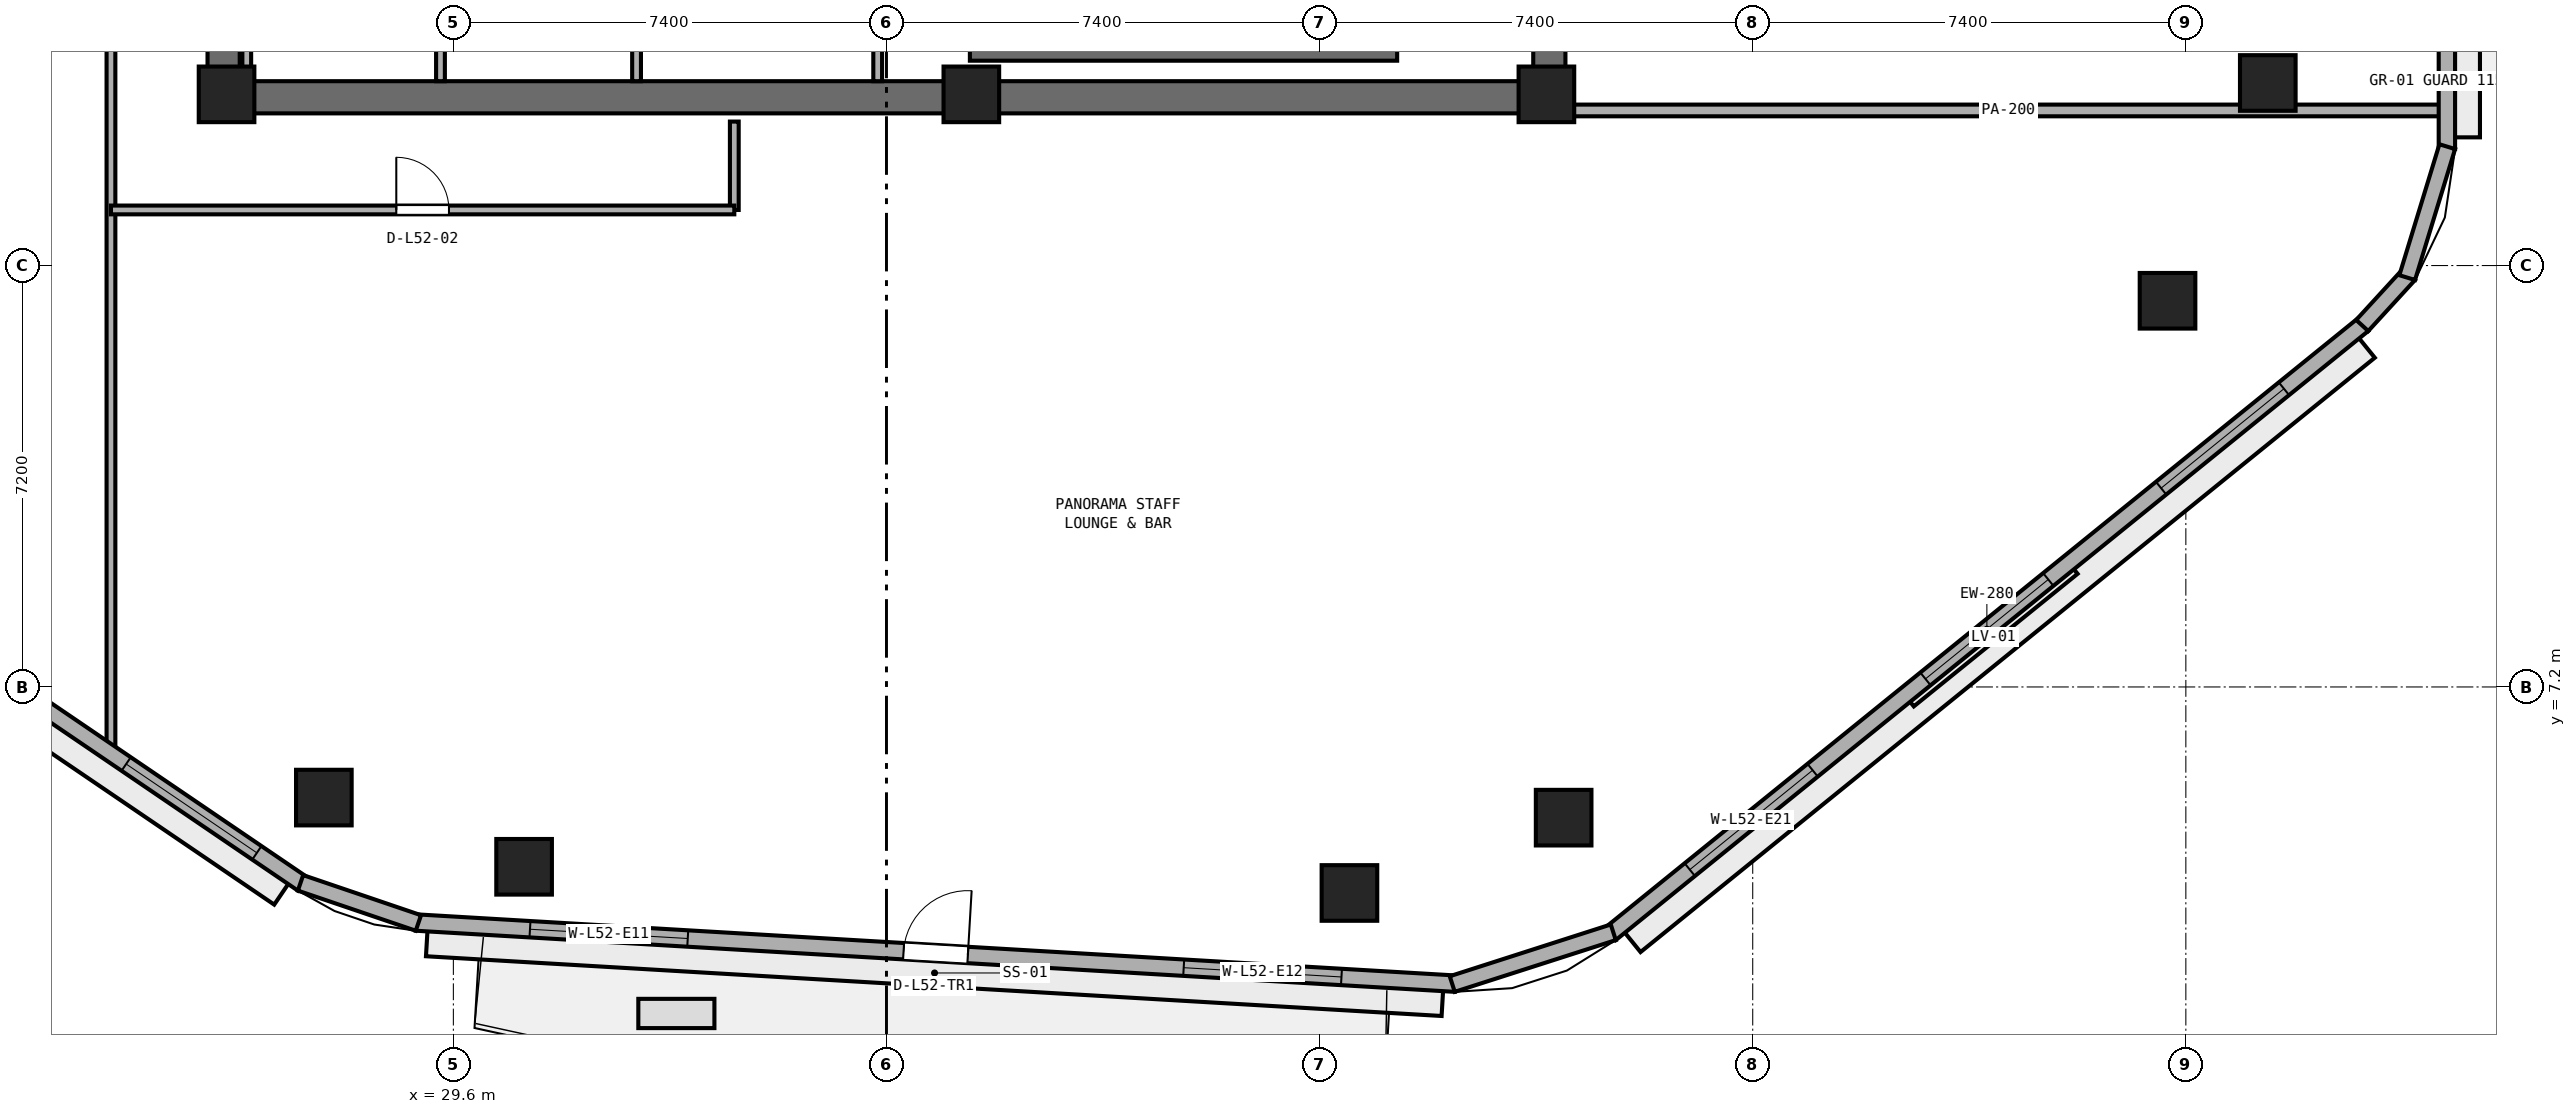
"""IFC4 building model, lengths in metres.
Left out: names, types, materials, properties, quantities, classifications, styles, units other than length and angle.
Written with IfcOpenShell. Run it as: python <this file> out.ifc"""

import sys

from ifc_helpers import new_model, si_unit, direction, frame, frame_2d, origin, origin_2d, place, context, subcontext, project, spatial, rectangle, extrude, element, fill, save


model = new_model("IFC4")
c1 = context("Model", 3, precision=1e-05, world=origin(), true_north=direction((0.0, 1.0)))
c2 = subcontext(c1, "Body", "Model", "MODEL_VIEW")
j1 = project(units=[si_unit("LENGTHUNIT", "METRE"), si_unit("PLANEANGLEUNIT", "RADIAN")], contexts=[c1])
p1 = place(None, origin())
s1 = spatial("IfcSite", under=j1, at=p1, CompositionType="ELEMENT")
p2 = place(p1, origin())
s2 = spatial("IfcBuilding", under=s1, at=p2, CompositionType="ELEMENT")
p3 = place(p2, frame((0.0, 0.0, 204.8)))
s3 = spatial("IfcBuildingStorey", under=s2, at=p3, CompositionType="ELEMENT", Elevation=204.8)
p4 = place(p3, frame((25.4, 17.275, 0.0), z_axis=(0.0, 0.0, 1.0), x_axis=(1.0, 0.0, 0.0)))
e1 = element("IfcWall", 1, at=p4, inside=s3, PredefinedType="SHEAR", context=c2, shape_type="SweptSolid", body=[
    extrude(rectangle(XDim=23.2, YDim=0.55, at=frame_2d((11.6, 0.0))), origin(), (0.0, 0.0, 1.0), 3.54),
])
p5 = place(p3, frame((25.675, 17.55, 0.0), z_axis=(0.0, 0.0, 1.0), x_axis=(0.0, 1.0, 0.0)))
e2 = element("IfcWall", 2, at=p5, inside=s3, PredefinedType="SHEAR", context=c2, shape_type="SweptSolid", body=[
    extrude(rectangle(XDim=15.3, YDim=0.55, at=frame_2d((7.65, 0.0))), origin(), (0.0, 0.0, 1.0), 3.54),
])
p6 = place(p5, frame((6.9, 0.0, 0.0)))
e3 = element("IfcOpeningElement", 3, at=p6, cuts=e2, PredefinedType="OPENING", context=c2, shape_type="SweptSolid", body=[
    extrude(rectangle(XDim=1.5, YDim=2.15, at=frame_2d((0.75, 1.075))), frame((0.0, 0.285, 0.0), z_axis=(0.0, -1.0, 0.0), x_axis=(1.0, 0.0, 0.0)), (0.0, 0.0, 1.0), 0.57),
])
p7 = place(p3, frame((48.325, 17.55, 0.0), z_axis=(0.0, 0.0, 1.0), x_axis=(0.0, 1.0, 0.0)))
e4 = element("IfcWall", 4, at=p7, inside=s3, PredefinedType="SHEAR", context=c2, shape_type="SweptSolid", body=[
    extrude(rectangle(XDim=15.3, YDim=0.55, at=frame_2d((7.65, 0.0))), origin(), (0.0, 0.0, 1.0), 3.54),
])
p8 = place(p7, frame((5.75, 0.0, 0.0)))
e5 = element("IfcOpeningElement", 5, at=p8, cuts=e4, PredefinedType="OPENING", context=c2, shape_type="SweptSolid", body=[
    extrude(rectangle(XDim=1.5, YDim=2.15, at=frame_2d((0.75, 1.075))), frame((0.0, 0.285, 0.0), z_axis=(0.0, -1.0, 0.0), x_axis=(1.0, 0.0, 0.0)), (0.0, 0.0, 1.0), 0.57),
])
for number, where, z_axis, x_axis in (
    (6, (25.725, 17.325, 0.0), (0.0, 0.0, 1.0), (1.0, 0.0, 0.0)),
    (7, (38.45, 17.325, 0.0), (0.0, 0.0, 1.0), (1.0, 0.0, 0.0)),
    (8, (48.275, 17.325, 0.0), (0.0, 0.0, 1.0), (1.0, 0.0, 0.0)),
):
    element("IfcColumn", number, at=place(p3, frame(where, z_axis=z_axis, x_axis=x_axis)), inside=s3, PredefinedType="PILASTER", context=c2, shape_type="SweptSolid", body=[
        extrude(rectangle(XDim=0.95, YDim=0.95, at=origin_2d()), origin(), (0.0, 0.0, 1.0), 3.8),
    ])
for number, where, z_axis, x_axis in (
    (9, (30.809, 4.127, 0.0), (0.0, 0.0, 1.0), (1.0, 0.0, 0.0)),
    (10, (44.91, 3.68, 0.0), (0.0, 0.0, 1.0), (1.0, 0.0, 0.0)),
    (11, (48.57, 4.967, 0.0), (0.0, 0.0, 1.0), (1.0, 0.0, 0.0)),
    (12, (58.887, 13.798, 0.0), (0.0, 0.0, 1.0), (1.0, 0.0, 0.0)),
    (13, (60.6, 17.519, 0.0), (0.0, 0.0, 1.0), (1.0, 0.0, 0.0)),
    (14, (27.387, 5.31, 0.0), (0.0, 0.0, 1.0), (1.0, 0.0, 0.0)),
):
    element("IfcColumn", number, at=place(p3, frame(where, z_axis=z_axis, x_axis=x_axis)), inside=s3, PredefinedType="COLUMN", context=c2, shape_type="SweptSolid", body=[
        extrude(rectangle(XDim=0.95, YDim=0.95, at=origin_2d()), origin(), (0.0, 0.0, 1.0), 3.8),
    ])
p9 = place(p3, frame((38.425, 18.025, 0.0), z_axis=(0.0, 0.0, 1.0), x_axis=(1.0, 0.0, 0.0)))
e15 = element("IfcWall", 15, at=p9, inside=s3, PredefinedType="SHEAR", context=c2, shape_type="SweptSolid", body=[
    extrude(rectangle(XDim=7.3, YDim=0.25, at=frame_2d((3.65, 0.0))), origin(), (0.0, 0.0, 1.0), 3.54),
])
p10 = place(p3, frame((26.07, 17.55, 0.0), z_axis=(0.0, 0.0, 1.0), x_axis=(0.0, 1.0, 0.0)))
e16 = element("IfcWall", 16, at=p10, inside=s3, PredefinedType="PARTITIONING", context=c2, shape_type="SweptSolid", body=[
    extrude(rectangle(XDim=2.2, YDim=0.15, at=frame_2d((1.1, 0.0))), origin(), (0.0, 0.0, 1.0), 2.64),
])
for number, where, z_axis, x_axis in (
    (17, (29.38, 17.55, 0.0), (0.0, 0.0, 1.0), (0.0, 1.0, 0.0)),
    (18, (32.73, 17.55, 0.0), (0.0, 0.0, 1.0), (0.0, 1.0, 0.0)),
    (19, (36.85, 17.55, 0.0), (0.0, 0.0, 1.0), (0.0, 1.0, 0.0)),
):
    element("IfcWall", number, at=place(p3, frame(where, z_axis=z_axis, x_axis=x_axis)), inside=s3, PredefinedType="PARTITIONING", context=c2, shape_type="SweptSolid", body=[
        extrude(rectangle(XDim=2.2, YDim=0.15, at=frame_2d((1.1, 0.0))), origin(), (0.0, 0.0, 1.0), 3.54),
    ])
p11 = place(p3, frame((34.4, 15.35, 0.0), z_axis=(0.0, 0.0, 1.0), x_axis=(0.0, 1.0, 0.0)))
e20 = element("IfcWall", 20, at=p11, inside=s3, PredefinedType="PARTITIONING", context=c2, shape_type="SweptSolid", body=[
    extrude(rectangle(XDim=1.51, YDim=0.15, at=frame_2d((0.755, 0.0))), origin(), (0.0, 0.0, 1.0), 3.54),
])
p12 = place(p3, frame((23.75, 6.031, 0.0), z_axis=(0.0, 0.0, 1.0), x_axis=(0.0, 1.0, 0.0)))
e21 = element("IfcWall", 21, at=p12, inside=s3, PredefinedType="PARTITIONING", context=c2, shape_type="SweptSolid", body=[
    extrude(rectangle(XDim=17.819, YDim=0.15, at=frame_2d((8.91, 0.0))), origin(), (0.0, 0.0, 1.0), 3.54),
])
p13 = place(p12, frame((12.294, 0.0, 0.0)))
e22 = element("IfcOpeningElement", 22, at=p13, cuts=e21, PredefinedType="OPENING", context=c2, shape_type="SweptSolid", body=[
    extrude(rectangle(XDim=0.9, YDim=2.1, at=frame_2d((0.45, 1.05))), frame((0.0, 0.085, 0.0), z_axis=(0.0, -1.0, 0.0), x_axis=(1.0, 0.0, 0.0)), (0.0, 0.0, 1.0), 0.17),
])
p14 = place(p3, frame((23.75, 15.35, 0.0), z_axis=(0.0, 0.0, 1.0), x_axis=(1.0, 0.0, 0.0)))
e23 = element("IfcWall", 23, at=p14, inside=s3, PredefinedType="PARTITIONING", context=c2, shape_type="SweptSolid", body=[
    extrude(rectangle(XDim=10.65, YDim=0.15, at=frame_2d((5.325, 0.0))), origin(), (0.0, 0.0, 1.0), 3.54),
])
p15 = place(p14, frame((4.875, 0.0, 0.0)))
e24 = element("IfcOpeningElement", 24, at=p15, cuts=e23, PredefinedType="OPENING", context=c2, shape_type="SweptSolid", body=[
    extrude(rectangle(XDim=0.9, YDim=2.1, at=frame_2d((0.45, 1.05))), frame((0.0, 0.085, 0.0), z_axis=(0.0, -1.0, 0.0), x_axis=(1.0, 0.0, 0.0)), (0.0, 0.0, 1.0), 0.17),
])
p16 = place(p3, frame((48.74, 17.05, 0.0), z_axis=(0.0, 0.0, 1.0), x_axis=(1.0, 0.0, 0.0)))
e25 = element("IfcWall", 25, at=p16, inside=s3, PredefinedType="PARTITIONING", context=c2, shape_type="SweptSolid", body=[
    extrude(rectangle(XDim=14.855, YDim=0.2, at=frame_2d((7.427, 0.0))), origin(), (0.0, 0.0, 1.0), 2.923),
])
p17 = place(p3, frame((28.966, 3.175, 0.0), z_axis=(0.0, 0.0, 1.0), x_axis=(0.998274467859, -0.058720412304, 0.0)))
e26 = element("IfcWall", 26, at=p17, inside=s3, PredefinedType="STANDARD", context=c2, shape_type="SweptSolid", body=[
    extrude(rectangle(XDim=17.782, YDim=0.28, at=frame_2d((8.891, 0.0))), origin(), (0.0, 0.0, 1.0), 3.54),
])
p18 = place(p17, frame((8.341, 0.0, 0.0)))
e27 = element("IfcOpeningElement", 27, at=p18, cuts=e26, PredefinedType="OPENING", context=c2, shape_type="SweptSolid", body=[
    extrude(rectangle(XDim=1.1, YDim=2.2, at=frame_2d((0.55, 1.1))), frame((0.0, 0.15, 0.0), z_axis=(0.0, -1.0, 0.0), x_axis=(1.0, 0.0, 0.0)), (0.0, 0.0, 1.0), 0.3),
])
p19 = place(p17, frame((1.947, 0.0, 0.9)))
e28 = element("IfcOpeningElement", 28, at=p19, cuts=e26, PredefinedType="OPENING", context=c2, shape_type="SweptSolid", body=[
    extrude(rectangle(XDim=2.7, YDim=1.75, at=frame_2d((1.35, 0.875))), frame((0.0, 0.15, 0.0), z_axis=(0.0, -1.0, 0.0), x_axis=(1.0, 0.0, 0.0)), (0.0, 0.0, 1.0), 0.3),
])
p20 = place(p17, frame((13.135, 0.0, 0.9)))
e29 = element("IfcOpeningElement", 29, at=p20, cuts=e26, PredefinedType="OPENING", context=c2, shape_type="SweptSolid", body=[
    extrude(rectangle(XDim=2.7, YDim=1.75, at=frame_2d((1.35, 0.875))), frame((0.0, 0.15, 0.0), z_axis=(0.0, -1.0, 0.0), x_axis=(1.0, 0.0, 0.0)), (0.0, 0.0, 1.0), 0.3),
])
p21 = place(p3, frame((49.372, 2.984, 0.0), z_axis=(0.0, 0.0, 1.0), x_axis=(0.777278899851, 0.629156190343, 0.0)))
e30 = element("IfcWall", 30, at=p21, inside=s3, PredefinedType="STANDARD", context=c2, shape_type="SweptSolid", body=[
    extrude(rectangle(XDim=16.54, YDim=0.28, at=frame_2d((8.27, 0.0))), origin(), (0.0, 0.0, 1.0), 3.54),
])
p22 = place(p21, frame((1.74, 0.0, 0.9)))
e31 = element("IfcOpeningElement", 31, at=p22, cuts=e30, PredefinedType="OPENING", context=c2, shape_type="SweptSolid", body=[
    extrude(rectangle(XDim=2.7, YDim=1.75, at=frame_2d((1.35, 0.875))), frame((0.0, 0.15, 0.0), z_axis=(0.0, -1.0, 0.0), x_axis=(1.0, 0.0, 0.0)), (0.0, 0.0, 1.0), 0.3),
])
p23 = place(p21, frame((6.92, 0.0, 0.9)))
e32 = element("IfcOpeningElement", 32, at=p23, cuts=e30, PredefinedType="OPENING", context=c2, shape_type="SweptSolid", body=[
    extrude(rectangle(XDim=2.7, YDim=1.75, at=frame_2d((1.35, 0.875))), frame((0.0, 0.15, 0.0), z_axis=(0.0, -1.0, 0.0), x_axis=(1.0, 0.0, 0.0)), (0.0, 0.0, 1.0), 0.3),
])
p24 = place(p21, frame((12.1, 0.0, 0.9)))
e33 = element("IfcOpeningElement", 33, at=p24, cuts=e30, PredefinedType="OPENING", context=c2, shape_type="SweptSolid", body=[
    extrude(rectangle(XDim=2.7, YDim=1.75, at=frame_2d((1.35, 0.875))), frame((0.0, 0.15, 0.0), z_axis=(0.0, -1.0, 0.0), x_axis=(1.0, 0.0, 0.0)), (0.0, 0.0, 1.0), 0.3),
])
p25 = place(p3, frame((63.66, 16.39, 0.0), z_axis=(0.0, 0.0, 1.0), x_axis=(0.0, 1.0, 0.0)))
e34 = element("IfcWall", 34, at=p25, inside=s3, PredefinedType="STANDARD", context=c2, shape_type="SweptSolid", body=[
    extrude(rectangle(XDim=18.876, YDim=0.28, at=frame_2d((9.438, 0.0))), origin(), (0.0, 0.0, 1.0), 2.79),
])
p26 = place(p25, frame((8.588, 0.0, 0.0)))
e35 = element("IfcOpeningElement", 35, at=p26, cuts=e34, PredefinedType="OPENING", context=c2, shape_type="SweptSolid", body=[
    extrude(rectangle(XDim=1.1, YDim=2.2, at=frame_2d((0.55, 1.1))), frame((0.0, 0.15, 0.0), z_axis=(0.0, -1.0, 0.0), x_axis=(1.0, 0.0, 0.0)), (0.0, 0.0, 1.0), 0.3),
])
p27 = place(p25, frame((2.579, 0.0, 0.85)))
e36 = element("IfcOpeningElement", 36, at=p27, cuts=e34, PredefinedType="OPENING", context=c2, shape_type="SweptSolid", body=[
    extrude(rectangle(XDim=1.8, YDim=1.2, at=frame_2d((0.9, 0.6))), frame((0.0, 0.15, 0.0), z_axis=(0.0, -1.0, 0.0), x_axis=(1.0, 0.0, 0.0)), (0.0, 0.0, 1.0), 0.3),
])
p28 = place(p25, frame((14.497, 0.0, 0.85)))
e37 = element("IfcOpeningElement", 37, at=p28, cuts=e34, PredefinedType="OPENING", context=c2, shape_type="SweptSolid", body=[
    extrude(rectangle(XDim=1.8, YDim=1.2, at=frame_2d((0.9, 0.6))), frame((0.0, 0.15, 0.0), z_axis=(0.0, -1.0, 0.0), x_axis=(1.0, 0.0, 0.0)), (0.0, 0.0, 1.0), 0.3),
])
p29 = place(p3, frame((13.43, 13.075, 0.0), z_axis=(0.0, 0.0, 1.0), x_axis=(0.827025402003, -0.562164552815, 0.0)))
e38 = element("IfcWall", 38, at=p29, inside=s3, PredefinedType="STANDARD", context=c2, shape_type="SweptSolid", body=[
    extrude(rectangle(XDim=16.435, YDim=0.28, at=frame_2d((8.218, 0.0))), origin(), (0.0, 0.0, 1.0), 3.54),
])
p30 = place(p29, frame((1.722, 0.0, 0.9)))
e39 = element("IfcOpeningElement", 39, at=p30, cuts=e38, PredefinedType="OPENING", context=c2, shape_type="SweptSolid", body=[
    extrude(rectangle(XDim=2.7, YDim=1.75, at=frame_2d((1.35, 0.875))), frame((0.0, 0.15, 0.0), z_axis=(0.0, -1.0, 0.0), x_axis=(1.0, 0.0, 0.0)), (0.0, 0.0, 1.0), 0.3),
])
p31 = place(p29, frame((6.868, 0.0, 0.9)))
e40 = element("IfcOpeningElement", 40, at=p31, cuts=e38, PredefinedType="OPENING", context=c2, shape_type="SweptSolid", body=[
    extrude(rectangle(XDim=2.7, YDim=1.75, at=frame_2d((1.35, 0.875))), frame((0.0, 0.15, 0.0), z_axis=(0.0, -1.0, 0.0), x_axis=(1.0, 0.0, 0.0)), (0.0, 0.0, 1.0), 0.3),
])
p32 = place(p29, frame((12.793, 0.0, 0.9)))
e41 = element("IfcOpeningElement", 41, at=p32, cuts=e38, PredefinedType="OPENING", context=c2, shape_type="SweptSolid", body=[
    extrude(rectangle(XDim=2.7, YDim=1.75, at=frame_2d((1.35, 0.875))), frame((0.0, 0.15, 0.0), z_axis=(0.0, -1.0, 0.0), x_axis=(1.0, 0.0, 0.0)), (0.0, 0.0, 1.0), 0.3),
])
p33 = place(p3, frame((46.666, 2.124, 0.0), z_axis=(0.0, 0.0, 1.0), x_axis=(0.952065470694, 0.305894327363, 0.0)))
e42 = element("IfcWall", 42, at=p33, inside=s3, PredefinedType="STANDARD", context=c2, shape_type="SweptSolid", body=[
    extrude(rectangle(XDim=2.89, YDim=0.28, at=frame_2d((1.445, 0.0))), origin(), (0.0, 0.0, 1.0), 3.54),
])
p34 = place(p3, frame((62.213, 13.376, 0.0), z_axis=(0.0, 0.0, 1.0), x_axis=(0.675790054291, 0.737094161232, 0.0)))
e43 = element("IfcWall", 43, at=p34, inside=s3, PredefinedType="STANDARD", context=c2, shape_type="SweptSolid", body=[
    extrude(rectangle(XDim=1.183, YDim=0.28, at=frame_2d((0.591, 0.0))), origin(), (0.0, 0.0, 1.0), 3.54),
])
p35 = place(p3, frame((62.982, 14.194, 0.0), z_axis=(0.0, 0.0, 1.0), x_axis=(0.292398811023, 0.956296468315, 0.0)))
e44 = element("IfcWall", 44, at=p35, inside=s3, PredefinedType="STANDARD", context=c2, shape_type="SweptSolid", body=[
    extrude(rectangle(XDim=2.34, YDim=0.28, at=frame_2d((1.17, 0.0))), origin(), (0.0, 0.0, 1.0), 3.54),
])
p36 = place(p3, frame((26.989, 3.853, 0.0), z_axis=(0.0, 0.0, 1.0), x_axis=(0.946713959835, -0.322075578479, 0.0)))
e45 = element("IfcWall", 45, at=p36, inside=s3, PredefinedType="STANDARD", context=c2, shape_type="SweptSolid", body=[
    extrude(rectangle(XDim=2.127, YDim=0.28, at=frame_2d((1.063, 0.0))), origin(), (0.0, 0.0, 1.0), 3.54),
])
p37 = place(p15, origin())
e46 = element("IfcDoor", 46, at=p37, inside=s3, OperationType="SINGLE_SWING_LEFT", PredefinedType="DOOR", context=c2, shape_type="SweptSolid", body=[
    extrude(rectangle(XDim=0.9, YDim=2.1, at=frame_2d((0.45, 1.05))), frame((0.0, 0.025, 0.0), z_axis=(0.0, -1.0, 0.0), x_axis=(1.0, 0.0, 0.0)), (0.0, 0.0, 1.0), 0.05),
])
fill(e24, e46)
p38 = place(p18, origin())
e47 = element("IfcDoor", 47, at=p38, inside=s3, OperationType="SINGLE_SWING_RIGHT", PredefinedType="DOOR", context=c2, shape_type="SweptSolid", body=[
    extrude(rectangle(XDim=1.1, YDim=2.2, at=frame_2d((0.55, 1.1))), frame((0.0, 0.025, 0.0), z_axis=(0.0, -1.0, 0.0), x_axis=(1.0, 0.0, 0.0)), (0.0, 0.0, 1.0), 0.05),
])
fill(e27, e47)
p39 = place(p19, origin())
e48 = element("IfcWindow", 48, at=p39, inside=s3, PartitioningType="SINGLE_PANEL", PredefinedType="WINDOW", context=c2, shape_type="SweptSolid", body=[
    extrude(rectangle(XDim=2.7, YDim=1.75, at=frame_2d((1.35, 0.875))), frame((0.0, 0.03, 0.0), z_axis=(0.0, -1.0, 0.0), x_axis=(1.0, 0.0, 0.0)), (0.0, 0.0, 1.0), 0.06),
])
fill(e28, e48)
p40 = place(p20, origin())
e49 = element("IfcWindow", 49, at=p40, inside=s3, PartitioningType="SINGLE_PANEL", PredefinedType="WINDOW", context=c2, shape_type="SweptSolid", body=[
    extrude(rectangle(XDim=2.7, YDim=1.75, at=frame_2d((1.35, 0.875))), frame((0.0, 0.03, 0.0), z_axis=(0.0, -1.0, 0.0), x_axis=(1.0, 0.0, 0.0)), (0.0, 0.0, 1.0), 0.06),
])
fill(e29, e49)
p41 = place(p22, origin())
e50 = element("IfcWindow", 50, at=p41, inside=s3, PartitioningType="SINGLE_PANEL", PredefinedType="WINDOW", context=c2, shape_type="SweptSolid", body=[
    extrude(rectangle(XDim=2.7, YDim=1.75, at=frame_2d((1.35, 0.875))), frame((0.0, 0.03, 0.0), z_axis=(0.0, -1.0, 0.0), x_axis=(1.0, 0.0, 0.0)), (0.0, 0.0, 1.0), 0.06),
])
fill(e31, e50)
p42 = place(p23, origin())
e51 = element("IfcWindow", 51, at=p42, inside=s3, PartitioningType="SINGLE_PANEL", PredefinedType="WINDOW", context=c2, shape_type="SweptSolid", body=[
    extrude(rectangle(XDim=2.7, YDim=1.75, at=frame_2d((1.35, 0.875))), frame((0.0, 0.03, 0.0), z_axis=(0.0, -1.0, 0.0), x_axis=(1.0, 0.0, 0.0)), (0.0, 0.0, 1.0), 0.06),
])
fill(e32, e51)
p43 = place(p24, origin())
e52 = element("IfcWindow", 52, at=p43, inside=s3, PartitioningType="SINGLE_PANEL", PredefinedType="WINDOW", context=c2, shape_type="SweptSolid", body=[
    extrude(rectangle(XDim=2.7, YDim=1.75, at=frame_2d((1.35, 0.875))), frame((0.0, 0.03, 0.0), z_axis=(0.0, -1.0, 0.0), x_axis=(1.0, 0.0, 0.0)), (0.0, 0.0, 1.0), 0.06),
])
fill(e33, e52)
p44 = place(p32, origin())
e53 = element("IfcWindow", 53, at=p44, inside=s3, PartitioningType="SINGLE_PANEL", PredefinedType="WINDOW", context=c2, shape_type="SweptSolid", body=[
    extrude(rectangle(XDim=2.7, YDim=1.75, at=frame_2d((1.35, 0.875))), frame((0.0, 0.03, 0.0), z_axis=(0.0, -1.0, 0.0), x_axis=(1.0, 0.0, 0.0)), (0.0, 0.0, 1.0), 0.06),
])
fill(e41, e53)
save(model, sys.argv[1])
